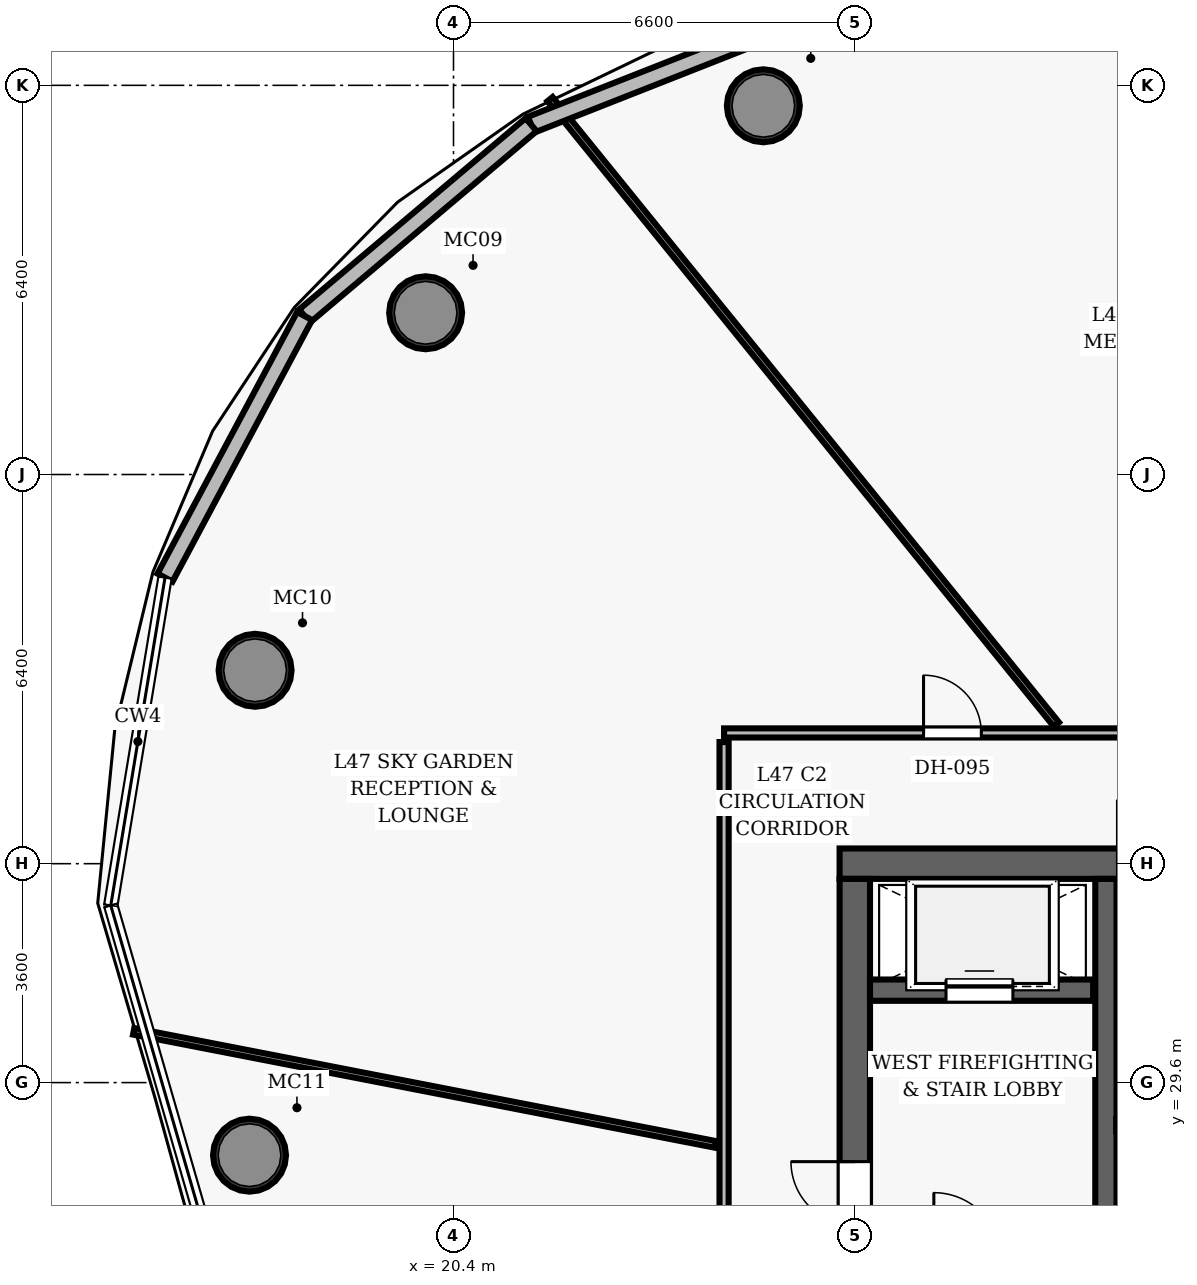
"""IFC4 building model, lengths in metres.
Left out: names, types, materials, properties, quantities, classifications, styles, units other than length and angle.
Written with IfcOpenShell. Run it as: python <this file> out.ifc"""

import sys

from ifc_helpers import new_model, si_unit, direction, frame, frame_2d, origin, origin_2d, place, context, subcontext, project, spatial, rectangle, hollow_circle, extrude, element, fill, save


model = new_model("IFC4")
c1 = context("Model", 3, precision=1e-05, world=origin(), true_north=direction((0.0, 1.0)))
c2 = subcontext(c1, "Body", "Model", "MODEL_VIEW")
j1 = project(units=[si_unit("LENGTHUNIT", "METRE"), si_unit("PLANEANGLEUNIT", "RADIAN")], contexts=[c1])
p1 = place(None, origin())
s1 = spatial("IfcSite", under=j1, at=p1, CompositionType="ELEMENT")
p2 = place(p1, origin())
s2 = spatial("IfcBuilding", under=s1, at=p2, CompositionType="ELEMENT")
p3 = place(p2, frame((0.0, 0.0, 186.6)))
s3 = spatial("IfcBuildingStorey", under=s2, at=p3, CompositionType="ELEMENT", Elevation=186.6)
p4 = place(p3, frame((26.75, 33.2, 0.0), z_axis=(0.0, 0.0, 1.0), x_axis=(1.0, 0.0, 0.0)))
e1 = element("IfcWall", 1, at=p4, inside=s3, PredefinedType="SHEAR", context=c2, shape_type="SweptSolid", body=[
    extrude(rectangle(XDim=22.5, YDim=0.5, at=frame_2d((11.25, 0.0))), origin(), (0.0, 0.0, 1.0), 3.85),
])
p5 = place(p4, frame((4.57, 0.0, 0.0)))
e2 = element("IfcOpeningElement", 2, at=p5, cuts=e1, PredefinedType="OPENING", context=c2, shape_type="SweptSolid", body=[
    extrude(rectangle(XDim=1.05, YDim=2.15, at=frame_2d((0.525, 1.075))), frame((0.0, 0.26, 0.0), z_axis=(0.0, -1.0, 0.0), x_axis=(1.0, 0.0, 0.0)), (0.0, 0.0, 1.0), 0.52),
])
p6 = place(p4, frame((14.47, 0.0, 0.0)))
e3 = element("IfcOpeningElement", 3, at=p6, cuts=e1, PredefinedType="OPENING", context=c2, shape_type="SweptSolid", body=[
    extrude(rectangle(XDim=1.05, YDim=2.15, at=frame_2d((0.525, 1.075))), frame((0.0, 0.26, 0.0), z_axis=(0.0, -1.0, 0.0), x_axis=(1.0, 0.0, 0.0)), (0.0, 0.0, 1.0), 0.52),
])
p7 = place(p3, frame((27.0, 19.05, 0.0), z_axis=(0.0, 0.0, 1.0), x_axis=(0.0, 1.0, 0.0)))
e4 = element("IfcWall", 4, at=p7, inside=s3, PredefinedType="SHEAR", context=c2, shape_type="SweptSolid", body=[
    extrude(rectangle(XDim=13.9, YDim=0.5, at=frame_2d((6.95, 0.0))), origin(), (0.0, 0.0, 1.0), 3.85),
])
p8 = place(p7, frame((8.2, 0.0, 0.0)))
e5 = element("IfcOpeningElement", 5, at=p8, cuts=e4, PredefinedType="OPENING", context=c2, shape_type="SweptSolid", body=[
    extrude(rectangle(XDim=1.05, YDim=2.15, at=frame_2d((0.525, 1.075))), frame((0.0, 0.26, 0.0), z_axis=(0.0, -1.0, 0.0), x_axis=(1.0, 0.0, 0.0)), (0.0, 0.0, 1.0), 0.52),
])
p9 = place(p3, frame((31.13, 19.05, 0.0), z_axis=(0.0, 0.0, 1.0), x_axis=(0.0, 1.0, 0.0)))
e6 = element("IfcWall", 6, at=p9, inside=s3, PredefinedType="SHEAR", context=c2, shape_type="SweptSolid", body=[
    extrude(rectangle(XDim=13.9, YDim=0.35, at=frame_2d((6.95, 0.0))), origin(), (0.0, 0.0, 1.0), 3.85),
])
for number, where, z_axis, x_axis in (
    (7, (25.496, 45.664, 0.0), (0.0, 0.0, 1.0), (1.0, 0.0, 0.0)),
    (8, (19.942, 42.26, 0.0), (0.0, 0.0, 1.0), (1.0, 0.0, 0.0)),
    (9, (17.137, 36.381, 0.0), (0.0, 0.0, 1.0), (1.0, 0.0, 0.0)),
    (10, (17.045, 28.406, 0.0), (0.0, 0.0, 1.0), (1.0, 0.0, 0.0)),
):
    element("IfcColumn", number, at=place(p3, frame(where, z_axis=z_axis, x_axis=x_axis)), inside=s3, PredefinedType="COLUMN", context=c2, shape_type="SweptSolid", body=[
        extrude(hollow_circle(Radius=0.6, WallThickness=0.05, at=origin_2d()), origin(), (0.0, 0.0, 1.0), 3.85),
    ])
p10 = place(p3, frame((27.25, 31.12, 0.0), z_axis=(0.0, 0.0, 1.0), x_axis=(1.0, 0.0, 0.0)))
e11 = element("IfcWall", 11, at=p10, inside=s3, PredefinedType="SHEAR", context=c2, shape_type="SweptSolid", body=[
    extrude(rectangle(XDim=3.67, YDim=0.35, at=frame_2d((1.835, 0.0))), origin(), (0.0, 0.0, 1.0), 3.035),
])
p11 = place(p10, frame((1.25, 0.0, 0.0)))
e12 = element("IfcOpeningElement", 12, at=p11, cuts=e11, PredefinedType="OPENING", context=c2, shape_type="SweptSolid", body=[
    extrude(rectangle(XDim=1.1, YDim=2.15, at=frame_2d((0.55, 1.075))), frame((0.0, 0.185, 0.0), z_axis=(0.0, -1.0, 0.0), x_axis=(1.0, 0.0, 0.0)), (0.0, 0.0, 1.0), 0.37),
])
p12 = place(p3, frame((31.3, 28.9, 0.0), z_axis=(0.0, 0.0, 1.0), x_axis=(1.0, 0.0, 0.0)))
e13 = element("IfcWall", 13, at=p12, inside=s3, PredefinedType="PARTITIONING", context=c2, shape_type="SweptSolid", body=[
    extrude(rectangle(XDim=1.12, YDim=0.2, at=frame_2d((0.56, 0.0))), origin(), (0.0, 0.0, 1.0), 3.035),
])
p13 = place(p3, frame((24.85, 35.35, 0.0), z_axis=(0.0, 0.0, 1.0), x_axis=(1.0, 0.0, 0.0)))
e14 = element("IfcWall", 14, at=p13, inside=s3, PredefinedType="PARTITIONING", context=c2, shape_type="SweptSolid", body=[
    extrude(rectangle(XDim=26.0, YDim=0.15, at=frame_2d((13.0, 0.0))), origin(), (0.0, 0.0, 1.0), 3.035),
])
p14 = place(p13, frame((14.715, 0.0, 0.0)))
e15 = element("IfcOpeningElement", 15, at=p14, cuts=e14, PredefinedType="OPENING", context=c2, shape_type="SweptSolid", body=[
    extrude(rectangle(XDim=0.95, YDim=2.15, at=frame_2d((0.475, 1.075))), frame((0.0, 0.085, 0.0), z_axis=(0.0, -1.0, 0.0), x_axis=(1.0, 0.0, 0.0)), (0.0, 0.0, 1.0), 0.17),
])
p15 = place(p13, frame((10.181, 0.0, 0.0)))
e16 = element("IfcOpeningElement", 16, at=p15, cuts=e14, PredefinedType="OPENING", context=c2, shape_type="SweptSolid", body=[
    extrude(rectangle(XDim=0.95, YDim=2.15, at=frame_2d((0.475, 1.075))), frame((0.0, 0.085, 0.0), z_axis=(0.0, -1.0, 0.0), x_axis=(1.0, 0.0, 0.0)), (0.0, 0.0, 1.0), 0.17),
])
p16 = place(p13, frame((3.281, 0.0, 0.0)))
e17 = element("IfcOpeningElement", 17, at=p16, cuts=e14, PredefinedType="OPENING", context=c2, shape_type="SweptSolid", body=[
    extrude(rectangle(XDim=0.95, YDim=2.15, at=frame_2d((0.475, 1.075))), frame((0.0, 0.085, 0.0), z_axis=(0.0, -1.0, 0.0), x_axis=(1.0, 0.0, 0.0)), (0.0, 0.0, 1.0), 0.17),
])
p17 = place(p3, frame((24.85, 27.08, 0.0), z_axis=(0.0, 0.0, 1.0), x_axis=(0.0, 1.0, 0.0)))
e18 = element("IfcWall", 18, at=p17, inside=s3, PredefinedType="PARTITIONING", context=c2, shape_type="SweptSolid", body=[
    extrude(rectangle(XDim=8.12, YDim=0.15, at=frame_2d((4.06, 0.0))), origin(), (0.0, 0.0, 1.0), 3.035),
])
p18 = place(p3, frame((30.315, 35.49, 0.0), z_axis=(0.0, 0.0, 1.0), x_axis=(-0.629321357583, 0.777145178773, 0.0)))
e19 = element("IfcWall", 19, at=p18, inside=s3, PredefinedType="PARTITIONING", context=c2, shape_type="SweptSolid", body=[
    extrude(rectangle(XDim=13.232, YDim=0.11, at=frame_2d((6.616, 0.0))), origin(), (0.0, 0.0, 1.0), 3.035),
])
p19 = place(p3, frame((24.71, 28.583, 0.0), z_axis=(0.0, 0.0, 1.0), x_axis=(-0.981624902582, 0.190820729041, 0.0)))
e20 = element("IfcWall", 20, at=p19, inside=s3, PredefinedType="PARTITIONING", context=c2, shape_type="SweptSolid", body=[
    extrude(rectangle(XDim=9.749, YDim=0.11, at=frame_2d((4.875, 0.0))), origin(), (0.0, 0.0, 1.0), 3.035),
])
p20 = place(p3, frame((21.677, 45.353, 0.0), z_axis=(0.0, 0.0, 1.0), x_axis=(0.930441630327, 0.366440135021, 0.0)))
e21 = element("IfcWall", 21, at=p20, inside=s3, PredefinedType="SOLIDWALL", context=c2, shape_type="SweptSolid", body=[
    extrude(rectangle(XDim=5.465, YDim=0.28, at=frame_2d((2.732, 0.0))), origin(), (0.0, 0.0, 1.0), 3.62),
])
p21 = place(p3, frame((17.951, 42.206, 0.0), z_axis=(0.0, 0.0, 1.0), x_axis=(0.763986040793, 0.645232771543, 0.0)))
e22 = element("IfcWall", 22, at=p21, inside=s3, PredefinedType="SOLIDWALL", context=c2, shape_type="SweptSolid", body=[
    extrude(rectangle(XDim=4.876, YDim=0.28, at=frame_2d((2.438, 0.0))), origin(), (0.0, 0.0, 1.0), 3.62),
])
p22 = place(p3, frame((15.656, 37.904, 0.0), z_axis=(0.0, 0.0, 1.0), x_axis=(0.470749349353, 0.882266994783, 0.0)))
e23 = element("IfcWall", 23, at=p22, inside=s3, PredefinedType="SOLIDWALL", context=c2, shape_type="SweptSolid", body=[
    extrude(rectangle(XDim=4.876, YDim=0.28, at=frame_2d((2.438, 0.0))), origin(), (0.0, 0.0, 1.0), 3.62),
])
p23 = place(p8, origin())
e24 = element("IfcDoor", 24, at=p23, inside=s3, OperationType="SINGLE_SWING_RIGHT", PredefinedType="DOOR", context=c2, shape_type="SweptSolid", body=[
    extrude(rectangle(XDim=1.05, YDim=2.15, at=frame_2d((0.525, 1.075))), frame((0.0, 0.025, 0.0), z_axis=(0.0, -1.0, 0.0), x_axis=(1.0, 0.0, 0.0)), (0.0, 0.0, 1.0), 0.05),
])
fill(e5, e24)
p24 = place(p16, origin())
e25 = element("IfcDoor", 25, at=p24, inside=s3, OperationType="SINGLE_SWING_LEFT", PredefinedType="DOOR", context=c2, shape_type="SweptSolid", body=[
    extrude(rectangle(XDim=0.95, YDim=2.15, at=frame_2d((0.475, 1.075))), frame((0.0, 0.025, 0.0), z_axis=(0.0, -1.0, 0.0), x_axis=(1.0, 0.0, 0.0)), (0.0, 0.0, 1.0), 0.05),
])
fill(e17, e25)
p25 = place(p11, origin())
e26 = element("IfcDoor", 26, at=p25, inside=s3, OperationType="SLIDING_TO_LEFT", PredefinedType="DOOR", context=c2, shape_type="SweptSolid", body=[
    extrude(rectangle(XDim=1.1, YDim=2.15, at=frame_2d((0.55, 1.075))), frame((0.0, 0.025, 0.0), z_axis=(0.0, -1.0, 0.0), x_axis=(1.0, 0.0, 0.0)), (0.0, 0.0, 1.0), 0.05),
])
fill(e12, e26)
save(model, sys.argv[1])
